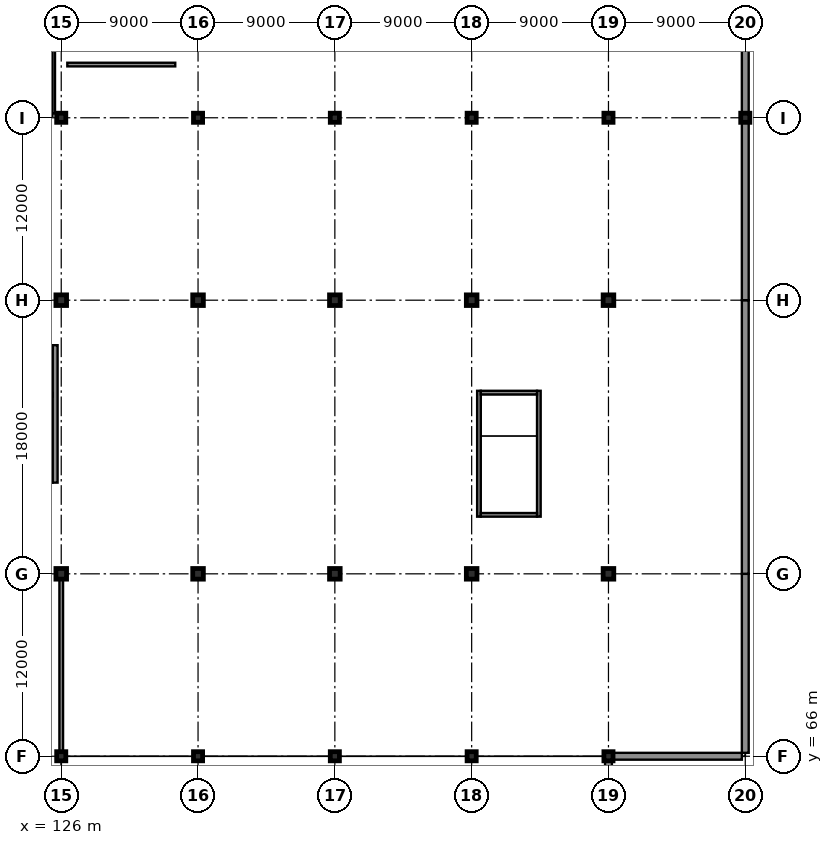
"""IFC4 building model, lengths in metres.
Left out: names, types, materials, properties, quantities, classifications, styles, units other than length and angle.
Written with IfcOpenShell. Run it as: python <this file> out.ifc"""

import sys

from ifc_helpers import new_model, si_unit, direction, frame, frame_2d, origin, origin_2d, place, context, subcontext, project, spatial, rectangle, extrude, element, fill, save


model = new_model("IFC4")
c1 = context("Model", 3, precision=1e-05, world=origin(), true_north=direction((0.0, 1.0)))
c2 = subcontext(c1, "Body", "Model", "MODEL_VIEW")
j1 = project(units=[si_unit("LENGTHUNIT", "METRE"), si_unit("PLANEANGLEUNIT", "RADIAN")], contexts=[c1])
p1 = place(None, origin())
s1 = spatial("IfcSite", under=j1, at=p1, CompositionType="ELEMENT")
p2 = place(p1, origin())
s2 = spatial("IfcBuilding", under=s1, at=p2, CompositionType="ELEMENT")
p3 = place(p2, frame((0.0, 0.0, -4.5)))
s3 = spatial("IfcBuildingStorey", under=s2, at=p3, CompositionType="ELEMENT", Elevation=-4.5)
p4 = place(p3, frame((126.0, 66.0, 0.0), z_axis=(0.0, 0.0, 1.0), x_axis=(1.0, 0.0, 0.0)))
e1 = element("IfcColumn", 1, at=p4, inside=s3, PredefinedType="COLUMN", context=c2, shape_type="SweptSolid", body=[
    extrude(rectangle(XDim=0.6, YDim=0.6, at=origin_2d()), origin(), (0.0, 0.0, 1.0), 4.5),
])
for number, where, z_axis, x_axis in (
    (2, (126.0, 78.0, 0.0), (0.0, 0.0, 1.0), (1.0, 0.0, 0.0)),
    (3, (126.0, 96.0, 0.0), (0.0, 0.0, 1.0), (1.0, 0.0, 0.0)),
):
    element("IfcColumn", number, at=place(p3, frame(where, z_axis=z_axis, x_axis=x_axis)), inside=s3, PredefinedType="COLUMN", context=c2, shape_type="SweptSolid", body=[
        extrude(rectangle(XDim=0.7, YDim=0.7, at=origin_2d()), origin(), (0.0, 0.0, 1.0), 4.5),
    ])
for number, where, z_axis, x_axis in (
    (4, (126.0, 108.0, 0.0), (0.0, 0.0, 1.0), (1.0, 0.0, 0.0)),
    (5, (135.0, 66.0, 0.0), (0.0, 0.0, 1.0), (1.0, 0.0, 0.0)),
):
    element("IfcColumn", number, at=place(p3, frame(where, z_axis=z_axis, x_axis=x_axis)), inside=s3, PredefinedType="COLUMN", context=c2, shape_type="SweptSolid", body=[
        extrude(rectangle(XDim=0.6, YDim=0.6, at=origin_2d()), origin(), (0.0, 0.0, 1.0), 4.5),
    ])
for number, where, z_axis, x_axis in (
    (6, (135.0, 78.0, 0.0), (0.0, 0.0, 1.0), (1.0, 0.0, 0.0)),
    (7, (135.0, 96.0, 0.0), (0.0, 0.0, 1.0), (1.0, 0.0, 0.0)),
):
    element("IfcColumn", number, at=place(p3, frame(where, z_axis=z_axis, x_axis=x_axis)), inside=s3, PredefinedType="COLUMN", context=c2, shape_type="SweptSolid", body=[
        extrude(rectangle(XDim=0.7, YDim=0.7, at=origin_2d()), origin(), (0.0, 0.0, 1.0), 4.5),
    ])
for number, where, z_axis, x_axis in (
    (8, (135.0, 108.0, 0.0), (0.0, 0.0, 1.0), (1.0, 0.0, 0.0)),
    (9, (144.0, 66.0, 0.0), (0.0, 0.0, 1.0), (1.0, 0.0, 0.0)),
):
    element("IfcColumn", number, at=place(p3, frame(where, z_axis=z_axis, x_axis=x_axis)), inside=s3, PredefinedType="COLUMN", context=c2, shape_type="SweptSolid", body=[
        extrude(rectangle(XDim=0.6, YDim=0.6, at=origin_2d()), origin(), (0.0, 0.0, 1.0), 4.5),
    ])
for number, where, z_axis, x_axis in (
    (10, (144.0, 78.0, 0.0), (0.0, 0.0, 1.0), (1.0, 0.0, 0.0)),
    (11, (144.0, 96.0, 0.0), (0.0, 0.0, 1.0), (1.0, 0.0, 0.0)),
):
    element("IfcColumn", number, at=place(p3, frame(where, z_axis=z_axis, x_axis=x_axis)), inside=s3, PredefinedType="COLUMN", context=c2, shape_type="SweptSolid", body=[
        extrude(rectangle(XDim=0.7, YDim=0.7, at=origin_2d()), origin(), (0.0, 0.0, 1.0), 4.5),
    ])
for number, where, z_axis, x_axis in (
    (12, (144.0, 108.0, 0.0), (0.0, 0.0, 1.0), (1.0, 0.0, 0.0)),
    (13, (153.0, 66.0, 0.0), (0.0, 0.0, 1.0), (1.0, 0.0, 0.0)),
):
    element("IfcColumn", number, at=place(p3, frame(where, z_axis=z_axis, x_axis=x_axis)), inside=s3, PredefinedType="COLUMN", context=c2, shape_type="SweptSolid", body=[
        extrude(rectangle(XDim=0.6, YDim=0.6, at=origin_2d()), origin(), (0.0, 0.0, 1.0), 4.5),
    ])
for number, where, z_axis, x_axis in (
    (14, (153.0, 78.0, 0.0), (0.0, 0.0, 1.0), (1.0, 0.0, 0.0)),
    (15, (153.0, 96.0, 0.0), (0.0, 0.0, 1.0), (1.0, 0.0, 0.0)),
):
    element("IfcColumn", number, at=place(p3, frame(where, z_axis=z_axis, x_axis=x_axis)), inside=s3, PredefinedType="COLUMN", context=c2, shape_type="SweptSolid", body=[
        extrude(rectangle(XDim=0.7, YDim=0.7, at=origin_2d()), origin(), (0.0, 0.0, 1.0), 4.5),
    ])
for number, where, z_axis, x_axis in (
    (16, (153.0, 108.0, 0.0), (0.0, 0.0, 1.0), (1.0, 0.0, 0.0)),
    (17, (162.0, 66.0, 0.0), (0.0, 0.0, 1.0), (1.0, 0.0, 0.0)),
):
    element("IfcColumn", number, at=place(p3, frame(where, z_axis=z_axis, x_axis=x_axis)), inside=s3, PredefinedType="COLUMN", context=c2, shape_type="SweptSolid", body=[
        extrude(rectangle(XDim=0.6, YDim=0.6, at=origin_2d()), origin(), (0.0, 0.0, 1.0), 4.5),
    ])
for number, where, z_axis, x_axis in (
    (18, (162.0, 78.0, 0.0), (0.0, 0.0, 1.0), (1.0, 0.0, 0.0)),
    (19, (162.0, 96.0, 0.0), (0.0, 0.0, 1.0), (1.0, 0.0, 0.0)),
):
    element("IfcColumn", number, at=place(p3, frame(where, z_axis=z_axis, x_axis=x_axis)), inside=s3, PredefinedType="COLUMN", context=c2, shape_type="SweptSolid", body=[
        extrude(rectangle(XDim=0.7, YDim=0.7, at=origin_2d()), origin(), (0.0, 0.0, 1.0), 4.5),
    ])
for number, where, z_axis, x_axis in (
    (20, (162.0, 108.0, 0.0), (0.0, 0.0, 1.0), (1.0, 0.0, 0.0)),
    (21, (171.0, 108.0, 0.0), (0.0, 0.0, 1.0), (1.0, 0.0, 0.0)),
):
    element("IfcColumn", number, at=place(p3, frame(where, z_axis=z_axis, x_axis=x_axis)), inside=s3, PredefinedType="COLUMN", context=c2, shape_type="SweptSolid", body=[
        extrude(rectangle(XDim=0.6, YDim=0.6, at=origin_2d()), origin(), (0.0, 0.0, 1.0), 4.5),
    ])
p5 = place(p3, frame((162.0, 54.296, 0.0), z_axis=(0.0, 0.0, 1.0), x_axis=(0.0, 1.0, 0.0)))
e22 = element("IfcWall", 22, at=p5, inside=s3, PredefinedType="USERDEFINED", context=c2, shape_type="SweptSolid", body=[
    extrude(rectangle(XDim=11.398, YDim=0.45, at=frame_2d((5.699, 0.0))), origin(), (0.0, 0.0, 1.0), 4.32),
])
p6 = place(p3, frame((162.306, 66.0, 0.0), z_axis=(0.0, 0.0, 1.0), x_axis=(1.0, 0.0, 0.0)))
e23 = element("IfcWall", 23, at=p6, inside=s3, PredefinedType="USERDEFINED", context=c2, shape_type="SweptSolid", body=[
    extrude(rectangle(XDim=8.469, YDim=0.45, at=frame_2d((4.234, 0.0))), origin(), (0.0, 0.0, 1.0), 4.32),
])
p7 = place(p3, frame((171.0, 66.225, 0.0), z_axis=(0.0, 0.0, 1.0), x_axis=(0.0, 1.0, 0.0)))
e24 = element("IfcWall", 24, at=p7, inside=s3, PredefinedType="USERDEFINED", context=c2, shape_type="SweptSolid", body=[
    extrude(rectangle(XDim=11.775, YDim=0.45, at=frame_2d((5.887, 0.0))), origin(), (0.0, 0.0, 1.0), 4.32),
])
p8 = place(p3, frame((171.0, 78.0, 0.0), z_axis=(0.0, 0.0, 1.0), x_axis=(0.0, 1.0, 0.0)))
e25 = element("IfcWall", 25, at=p8, inside=s3, PredefinedType="USERDEFINED", context=c2, shape_type="SweptSolid", body=[
    extrude(rectangle(XDim=18.0, YDim=0.45, at=frame_2d((9.0, 0.0))), origin(), (0.0, 0.0, 1.0), 4.32),
])
p9 = place(p3, frame((171.0, 96.0, 0.0), z_axis=(0.0, 0.0, 1.0), x_axis=(0.0, 1.0, 0.0)))
e26 = element("IfcWall", 26, at=p9, inside=s3, PredefinedType="USERDEFINED", context=c2, shape_type="SweptSolid", body=[
    extrude(rectangle(XDim=11.704, YDim=0.45, at=frame_2d((5.852, 0.0))), origin(), (0.0, 0.0, 1.0), 4.32),
])
p10 = place(p3, frame((171.0, 108.296, 0.0), z_axis=(0.0, 0.0, 1.0), x_axis=(0.0, 1.0, 0.0)))
e27 = element("IfcWall", 27, at=p10, inside=s3, PredefinedType="USERDEFINED", context=c2, shape_type="SweptSolid", body=[
    extrude(rectangle(XDim=11.408, YDim=0.45, at=frame_2d((5.704, 0.0))), origin(), (0.0, 0.0, 1.0), 4.32),
])
p11 = place(p3, frame((153.48, 81.76, 0.0), z_axis=(0.0, 0.0, 1.0), x_axis=(0.0, 1.0, 0.0)))
e28 = element("IfcWall", 28, at=p11, inside=s3, PredefinedType="SHEAR", context=c2, shape_type="SweptSolid", body=[
    extrude(rectangle(XDim=8.28, YDim=0.24, at=frame_2d((4.14, 0.0))), origin(), (0.0, 0.0, 1.0), 4.31),
])
p12 = place(p3, frame((157.42, 81.76, 0.0), z_axis=(0.0, 0.0, 1.0), x_axis=(0.0, 1.0, 0.0)))
e29 = element("IfcWall", 29, at=p12, inside=s3, PredefinedType="SHEAR", context=c2, shape_type="SweptSolid", body=[
    extrude(rectangle(XDim=8.28, YDim=0.24, at=frame_2d((4.14, 0.0))), origin(), (0.0, 0.0, 1.0), 4.31),
])
p13 = place(p12, frame((0.49, 0.0, 0.0)))
e30 = element("IfcOpeningElement", 30, at=p13, cuts=e29, PredefinedType="OPENING", context=c2, shape_type="SweptSolid", body=[
    extrude(rectangle(XDim=1.3, YDim=2.2, at=frame_2d((0.65, 1.1))), frame((0.0, 0.135, 0.0), z_axis=(0.0, -1.0, 0.0), x_axis=(1.0, 0.0, 0.0)), (0.0, 0.0, 1.0), 0.27),
])
for number, where, z_axis, x_axis in (
    (31, (153.6, 81.88, 0.0), (0.0, 0.0, 1.0), (1.0, 0.0, 0.0)),
    (32, (153.6, 89.92, 0.0), (0.0, 0.0, 1.0), (1.0, 0.0, 0.0)),
):
    element("IfcWall", number, at=place(p3, frame(where, z_axis=z_axis, x_axis=x_axis)), inside=s3, PredefinedType="SHEAR", context=c2, shape_type="SweptSolid", body=[
        extrude(rectangle(XDim=3.7, YDim=0.24, at=frame_2d((1.85, 0.0))), origin(), (0.0, 0.0, 1.0), 4.31),
    ])
p14 = place(p3, frame((121.54, 84.16, 0.0), z_axis=(0.0, 0.0, 1.0), x_axis=(1.0, 0.0, 0.0)))
e33 = element("IfcWall", 33, at=p14, inside=s3, PredefinedType="SHEAR", context=c2, shape_type="SweptSolid", body=[
    extrude(rectangle(XDim=3.9, YDim=0.32, at=frame_2d((1.95, 0.0))), origin(), (0.0, 0.0, 1.0), 4.16),
])
p15 = place(p14, frame((1.225, 0.0, 0.0)))
e34 = element("IfcOpeningElement", 34, at=p15, cuts=e33, PredefinedType="OPENING", context=c2, shape_type="SweptSolid", body=[
    extrude(rectangle(XDim=1.45, YDim=2.2, at=frame_2d((0.725, 1.1))), frame((0.0, 0.175, 0.0), z_axis=(0.0, -1.0, 0.0), x_axis=(1.0, 0.0, 0.0)), (0.0, 0.0, 1.0), 0.35),
])
p16 = place(p3, frame((125.6, 84.0, 0.0), z_axis=(0.0, 0.0, 1.0), x_axis=(0.0, 1.0, 0.0)))
e35 = element("IfcWall", 35, at=p16, inside=s3, PredefinedType="SHEAR", context=c2, shape_type="SweptSolid", body=[
    extrude(rectangle(XDim=9.04, YDim=0.32, at=frame_2d((4.52, 0.0))), origin(), (0.0, 0.0, 1.0), 4.16),
])
p17 = place(p3, frame((121.54, 89.78, 0.0), z_axis=(0.0, 0.0, 1.0), x_axis=(1.0, 0.0, 0.0)))
e36 = element("IfcWall", 36, at=p17, inside=s3, PredefinedType="SHEAR", context=c2, shape_type="SweptSolid", body=[
    extrude(rectangle(XDim=3.9, YDim=0.24, at=frame_2d((1.95, 0.0))), origin(), (0.0, 0.0, 1.0), 4.31),
])
p18 = place(p17, frame((0.385, 0.0, 0.0)))
e37 = element("IfcOpeningElement", 37, at=p18, cuts=e36, PredefinedType="OPENING", context=c2, shape_type="SweptSolid", body=[
    extrude(rectangle(XDim=1.3, YDim=2.2, at=frame_2d((0.65, 1.1))), frame((0.0, 0.135, 0.0), z_axis=(0.0, -1.0, 0.0), x_axis=(1.0, 0.0, 0.0)), (0.0, 0.0, 1.0), 0.27),
])
p19 = place(p17, frame((2.335, 0.0, 0.0)))
e38 = element("IfcOpeningElement", 38, at=p19, cuts=e36, PredefinedType="OPENING", context=c2, shape_type="SweptSolid", body=[
    extrude(rectangle(XDim=1.3, YDim=2.2, at=frame_2d((0.65, 1.1))), frame((0.0, 0.135, 0.0), z_axis=(0.0, -1.0, 0.0), x_axis=(1.0, 0.0, 0.0)), (0.0, 0.0, 1.0), 0.27),
])
p20 = place(p3, frame((121.54, 92.92, 0.0), z_axis=(0.0, 0.0, 1.0), x_axis=(1.0, 0.0, 0.0)))
e39 = element("IfcWall", 39, at=p20, inside=s3, PredefinedType="SHEAR", context=c2, shape_type="SweptSolid", body=[
    extrude(rectangle(XDim=3.9, YDim=0.24, at=frame_2d((1.95, 0.0))), origin(), (0.0, 0.0, 1.0), 4.31),
])
p21 = place(p3, frame((126.0, 66.296, 0.0), z_axis=(0.0, 0.0, 1.0), x_axis=(0.0, 1.0, 0.0)))
e40 = element("IfcWall", 40, at=p21, inside=s3, PredefinedType="SHEAR", context=c2, shape_type="SweptSolid", body=[
    extrude(rectangle(XDim=11.358, YDim=0.24, at=frame_2d((5.679, 0.0))), origin(), (0.0, 0.0, 1.0), 3.755),
])
p22 = place(p3, frame((126.4, 111.5, 0.0), z_axis=(0.0, 0.0, 1.0), x_axis=(1.0, 0.0, 0.0)))
e41 = element("IfcWall", 41, at=p22, inside=s3, PredefinedType="SHEAR", context=c2, shape_type="SweptSolid", body=[
    extrude(rectangle(XDim=7.1, YDim=0.24, at=frame_2d((3.55, 0.0))), origin(), (0.0, 0.0, 1.0), 3.64),
])
p23 = place(p22, frame((1.75, 0.0, 0.0)))
e42 = element("IfcOpeningElement", 42, at=p23, cuts=e41, PredefinedType="OPENING", context=c2, shape_type="SweptSolid", body=[
    extrude(rectangle(XDim=3.6, YDim=2.6, at=frame_2d((1.8, 1.3))), frame((0.0, 0.135, 0.0), z_axis=(0.0, -1.0, 0.0), x_axis=(1.0, 0.0, 0.0)), (0.0, 0.0, 1.0), 0.27),
])
p24 = place(p3, frame((125.5, 119.78, 0.0), z_axis=(0.0, 0.0, 1.0), x_axis=(0.0, -1.0, 0.0)))
e43 = element("IfcWall", 43, at=p24, inside=s3, PredefinedType="PARTITIONING", context=c2, shape_type="SweptSolid", body=[
    extrude(rectangle(XDim=11.5, YDim=0.18, at=frame_2d((5.75, 0.0))), origin(), (0.0, 0.0, 1.0), 4.14),
])
p25 = place(p3, frame((125.42, 108.2, 0.0), z_axis=(0.0, 0.0, 1.0), x_axis=(-1.0, 0.0, 0.0)))
e44 = element("IfcWall", 44, at=p25, inside=s3, PredefinedType="PARTITIONING", context=c2, shape_type="SweptSolid", body=[
    extrude(rectangle(XDim=25.84, YDim=0.18, at=frame_2d((12.92, 0.0))), origin(), (0.0, 0.0, 1.0), 3.645),
])
p26 = place(p25, frame((9.945, 0.0, 0.0)))
e45 = element("IfcOpeningElement", 45, at=p26, cuts=e44, PredefinedType="OPENING", context=c2, shape_type="SweptSolid", body=[
    extrude(rectangle(XDim=1.15, YDim=2.15, at=frame_2d((0.575, 1.075))), frame((0.0, 0.105, 0.0), z_axis=(0.0, -1.0, 0.0), x_axis=(1.0, 0.0, 0.0)), (0.0, 0.0, 1.0), 0.21),
])
p27 = place(p25, frame((23.19, 0.0, 1.05)))
e46 = element("IfcOpeningElement", 46, at=p27, cuts=e44, PredefinedType="OPENING", context=c2, shape_type="SweptSolid", body=[
    extrude(rectangle(XDim=1.8, YDim=1.1, at=frame_2d((0.9, 0.55))), frame((0.0, 0.105, 0.0), z_axis=(0.0, -1.0, 0.0), x_axis=(1.0, 0.0, 0.0)), (0.0, 0.0, 1.0), 0.21),
])
p28 = place(p13, frame((1.3, 0.0, 0.0), z_axis=(0.0, 0.0, 1.0), x_axis=(-1.0, 0.0, 0.0)))
e47 = element("IfcDoor", 47, at=p28, inside=s3, OperationType="SINGLE_SWING_RIGHT", PredefinedType="DOOR", context=c2, shape_type="SweptSolid", body=[
    extrude(rectangle(XDim=1.3, YDim=2.2, at=frame_2d((0.65, 1.1))), frame((0.0, 0.025, 0.0), z_axis=(0.0, -1.0, 0.0), x_axis=(1.0, 0.0, 0.0)), (0.0, 0.0, 1.0), 0.05),
])
fill(e30, e47)
p29 = place(p23, frame((3.6, 0.0, 0.0), z_axis=(0.0, 0.0, 1.0), x_axis=(-1.0, 0.0, 0.0)))
e48 = element("IfcDoor", 48, at=p29, inside=s3, OperationType="ROLLINGUP", PredefinedType="GATE", context=c2, shape_type="SweptSolid", body=[
    extrude(rectangle(XDim=3.6, YDim=2.6, at=frame_2d((1.8, 1.3))), frame((0.0, 0.025, 0.0), z_axis=(0.0, -1.0, 0.0), x_axis=(1.0, 0.0, 0.0)), (0.0, 0.0, 1.0), 0.05),
])
fill(e42, e48)
save(model, sys.argv[1])
